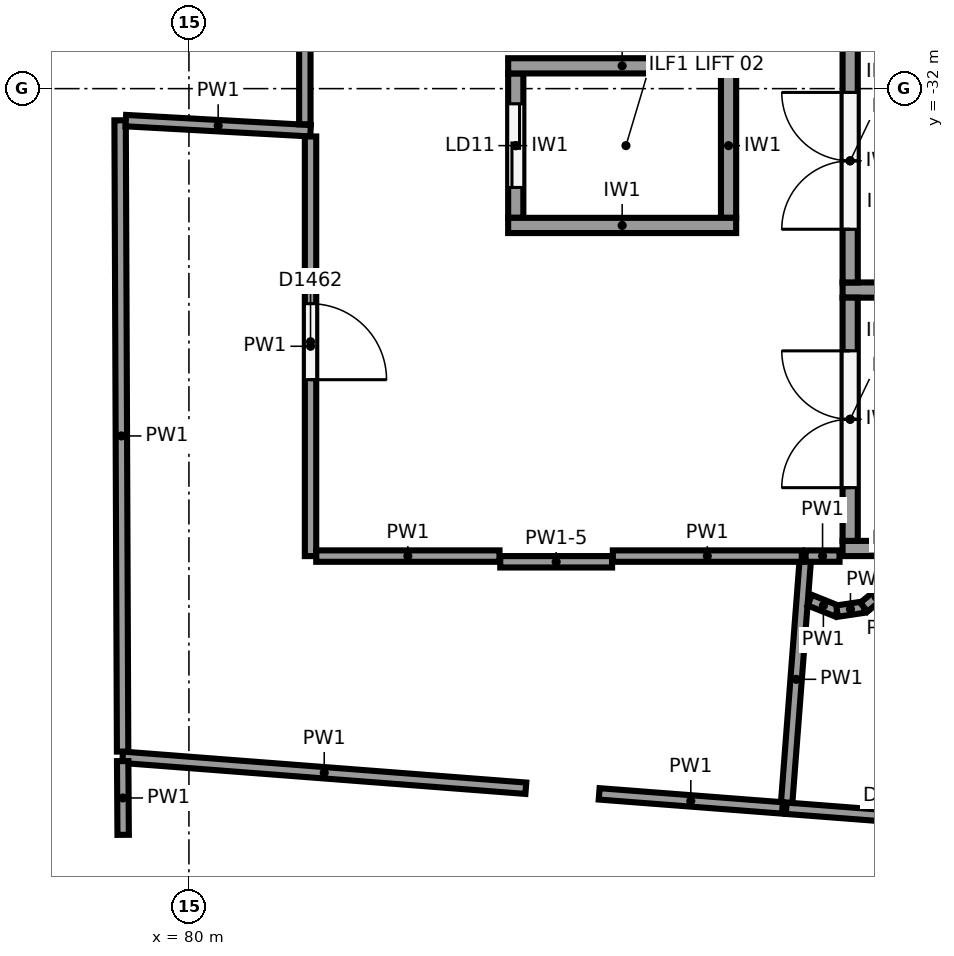
"""IFC4 building model, lengths in metres.
Left out: names, types, materials, properties, quantities, classifications, styles, units other than length and angle.
Written with IfcOpenShell. Run it as: python <this file> out.ifc"""

import sys

from ifc_helpers import new_model, si_unit, direction, frame, frame_2d, origin, place, context, subcontext, project, spatial, rectangle, extrude, element, fill, save


model = new_model("IFC4")
c1 = context("Model", 3, precision=1e-05, world=origin(), true_north=direction((0.0, 1.0)))
c2 = subcontext(c1, "Body", "Model", "MODEL_VIEW")
j1 = project(units=[si_unit("LENGTHUNIT", "METRE"), si_unit("PLANEANGLEUNIT", "RADIAN")], contexts=[c1])
p1 = place(None, origin())
s1 = spatial("IfcSite", under=j1, at=p1, CompositionType="ELEMENT")
p2 = place(p1, origin())
s2 = spatial("IfcBuilding", under=s1, at=p2, CompositionType="ELEMENT")
p3 = place(p2, frame((0.0, 0.0, 18.0)))
s3 = spatial("IfcBuildingStorey", under=s2, at=p3, CompositionType="ELEMENT", Elevation=18.0)
for number, where, z_axis, x_axis in (
    (1, (97.6, -38.05, 0.0), (0.0, 0.0, 1.0), (-1.0, 0.0, 0.0)),
    (2, (97.6, -34.65, 0.0), (0.0, 0.0, 1.0), (-1.0, 0.0, 0.0)),
):
    element("IfcWall", number, at=place(p3, frame(where, z_axis=z_axis, x_axis=x_axis)), inside=s3, PredefinedType="SHEAR", context=c2, shape_type="SweptSolid", body=[
        extrude(rectangle(XDim=9.0, YDim=0.2, at=frame_2d((4.5, 0.0))), origin(), (0.0, 0.0, 1.0), 5.6),
    ])
p4 = place(p3, frame((88.7, -37.95, 0.0), z_axis=(0.0, 0.0, 1.0), x_axis=(0.0, 1.0, 0.0)))
e3 = element("IfcWall", 3, at=p4, inside=s3, PredefinedType="SHEAR", context=c2, shape_type="SweptSolid", body=[
    extrude(rectangle(XDim=3.2, YDim=0.2, at=frame_2d((1.6, 0.0))), origin(), (0.0, 0.0, 1.0), 5.6),
])
p5 = place(p4, frame((0.7, 0.0, 0.0)))
e4 = element("IfcOpeningElement", 4, at=p5, cuts=e3, PredefinedType="OPENING", context=c2, shape_type="SweptSolid", body=[
    extrude(rectangle(XDim=1.8, YDim=2.1, at=frame_2d((0.9, 1.05))), frame((0.0, 0.11, 0.0), z_axis=(0.0, -1.0, 0.0), x_axis=(1.0, 0.0, 0.0)), (0.0, 0.0, 1.0), 0.22),
])
p6 = place(p3, frame((88.7, -34.55, 0.0), z_axis=(0.0, 0.0, 1.0), x_axis=(0.0, 1.0, 0.0)))
e5 = element("IfcWall", 5, at=p6, inside=s3, PredefinedType="SHEAR", context=c2, shape_type="SweptSolid", body=[
    extrude(rectangle(XDim=3.2, YDim=0.2, at=frame_2d((1.6, 0.0))), origin(), (0.0, 0.0, 1.0), 5.6),
])
p7 = place(p6, frame((0.7, 0.0, 0.0)))
e6 = element("IfcOpeningElement", 6, at=p7, cuts=e5, PredefinedType="OPENING", context=c2, shape_type="SweptSolid", body=[
    extrude(rectangle(XDim=1.8, YDim=2.1, at=frame_2d((0.9, 1.05))), frame((0.0, 0.11, 0.0), z_axis=(0.0, -1.0, 0.0), x_axis=(1.0, 0.0, 0.0)), (0.0, 0.0, 1.0), 0.22),
])
for number, where, z_axis, x_axis in (
    (7, (87.2, -33.8, 0.0), (0.0, 0.0, 1.0), (-1.0, 0.0, 0.0)),
    (8, (87.2, -31.7, 0.0), (0.0, 0.0, 1.0), (-1.0, 0.0, 0.0)),
):
    element("IfcWall", number, at=place(p3, frame(where, z_axis=z_axis, x_axis=x_axis)), inside=s3, PredefinedType="SHEAR", context=c2, shape_type="SweptSolid", body=[
        extrude(rectangle(XDim=3.0, YDim=0.2, at=frame_2d((1.5, 0.0))), origin(), (0.0, 0.0, 1.0), 5.6),
    ])
p8 = place(p3, frame((87.1, -33.7, 0.0), z_axis=(0.0, 0.0, 1.0), x_axis=(0.0, 1.0, 0.0)))
e9 = element("IfcWall", 9, at=p8, inside=s3, PredefinedType="SHEAR", context=c2, shape_type="SweptSolid", body=[
    extrude(rectangle(XDim=1.9, YDim=0.2, at=frame_2d((0.95, 0.0))), origin(), (0.0, 0.0, 1.0), 5.6),
])
p9 = place(p3, frame((84.3, -33.7, 0.0), z_axis=(0.0, 0.0, 1.0), x_axis=(0.0, 1.0, 0.0)))
e10 = element("IfcWall", 10, at=p9, inside=s3, PredefinedType="SHEAR", context=c2, shape_type="SweptSolid", body=[
    extrude(rectangle(XDim=1.9, YDim=0.2, at=frame_2d((0.95, 0.0))), origin(), (0.0, 0.0, 1.0), 5.6),
])
p10 = place(p9, frame((0.4, 0.0, 0.0)))
e11 = element("IfcOpeningElement", 11, at=p10, cuts=e10, PredefinedType="OPENING", context=c2, shape_type="SweptSolid", body=[
    extrude(rectangle(XDim=1.1, YDim=2.1, at=frame_2d((0.55, 1.05))), frame((0.0, 0.11, 0.0), z_axis=(0.0, -1.0, 0.0), x_axis=(1.0, 0.0, 0.0)), (0.0, 0.0, 1.0), 0.22),
])
p11 = place(p3, frame((92.672, -41.837, 0.0), z_axis=(0.0, 0.0, 1.0), x_axis=(-0.997068154384, 0.07651859587, 0.0)))
e12 = element("IfcWall", 12, at=p11, inside=s3, PredefinedType="PARTITIONING", context=c2, shape_type="SweptSolid", body=[
    extrude(rectangle(XDim=4.827, YDim=0.15, at=frame_2d((2.414, 0.0))), origin(), (0.0, 0.0, 1.0), 5.6),
])
p12 = place(p11, frame((1.95, 0.0, 0.0)))
e13 = element("IfcOpeningElement", 13, at=p12, cuts=e12, PredefinedType="OPENING", context=c2, shape_type="SweptSolid", body=[
    extrude(rectangle(XDim=1.0, YDim=2.1, at=frame_2d((0.5, 1.05))), frame((0.0, 0.085, 0.0), z_axis=(0.0, -1.0, 0.0), x_axis=(1.0, 0.0, 0.0)), (0.0, 0.0, 1.0), 0.17),
])
p13 = place(p3, frame((87.865, -41.392, 0.0), z_axis=(0.0, 0.0, 1.0), x_axis=(0.076501302727, 0.997069481371, 0.0)))
e14 = element("IfcWall", 14, at=p13, inside=s3, PredefinedType="PARTITIONING", context=c2, shape_type="SweptSolid", body=[
    extrude(rectangle(XDim=3.252, YDim=0.15, at=frame_2d((1.626, 0.0))), origin(), (0.0, 0.0, 1.0), 5.6),
])
p14 = place(p3, frame((88.113, -38.15, 0.0), z_axis=(0.0, 0.0, 1.0), x_axis=(1.0, 0.0, 0.0)))
e15 = element("IfcWall", 15, at=p14, inside=s3, PredefinedType="PARTITIONING", context=c2, shape_type="SweptSolid", body=[
    extrude(rectangle(XDim=0.447, YDim=0.15, at=frame_2d((0.223, 0.0))), origin(), (0.0, 0.0, 1.0), 5.6),
])
p15 = place(p3, frame((87.809, -41.463, 0.0), z_axis=(0.0, 0.0, 1.0), x_axis=(-0.997068127428, 0.076518947109, 0.0)))
e16 = element("IfcWall", 16, at=p15, inside=s3, PredefinedType="PARTITIONING", context=c2, shape_type="SweptSolid", body=[
    extrude(rectangle(XDim=2.418, YDim=0.15, at=frame_2d((1.209, 0.0))), origin(), (0.0, 0.0, 1.0), 5.6),
])
p16 = place(p3, frame((84.433, -41.204, 0.0), z_axis=(0.0, 0.0, 1.0), x_axis=(-0.997070388633, 0.076489477122, 0.0)))
e17 = element("IfcWall", 17, at=p16, inside=s3, PredefinedType="PARTITIONING", context=c2, shape_type="SweptSolid", body=[
    extrude(rectangle(XDim=5.321, YDim=0.15, at=frame_2d((2.66, 0.0))), origin(), (0.0, 0.0, 1.0), 5.6),
])
p17 = place(p3, frame((79.127, -40.722, 0.0), z_axis=(0.0, 0.0, 1.0), x_axis=(-0.003939176304, 0.999992241415, 0.0)))
e18 = element("IfcWall", 18, at=p17, inside=s3, PredefinedType="PARTITIONING", context=c2, shape_type="SweptSolid", body=[
    extrude(rectangle(XDim=8.305, YDim=0.15, at=frame_2d((4.152, 0.0))), origin(), (0.0, 0.0, 1.0), 5.6),
])
p18 = place(p3, frame((79.169, -32.421, 0.0), z_axis=(0.0, 0.0, 1.0), x_axis=(0.998499599384, -0.054759017805, 0.0)))
e19 = element("IfcWall", 19, at=p18, inside=s3, PredefinedType="PARTITIONING", context=c2, shape_type="SweptSolid", body=[
    extrude(rectangle(XDim=2.434, YDim=0.15, at=frame_2d((1.217, 0.0))), origin(), (0.0, 0.0, 1.0), 5.6),
])
p19 = place(p3, frame((81.6, -32.629, 0.0), z_axis=(0.0, 0.0, 1.0), x_axis=(0.0, -1.0, 0.0)))
e20 = element("IfcWall", 20, at=p19, inside=s3, PredefinedType="PARTITIONING", context=c2, shape_type="SweptSolid", body=[
    extrude(rectangle(XDim=5.521, YDim=0.15, at=frame_2d((2.76, 0.0))), origin(), (0.0, 0.0, 1.0), 5.6),
])
p20 = place(p19, frame((2.2, 0.0, 0.0)))
e21 = element("IfcOpeningElement", 21, at=p20, cuts=e20, PredefinedType="OPENING", context=c2, shape_type="SweptSolid", body=[
    extrude(rectangle(XDim=1.0, YDim=2.1, at=frame_2d((0.5, 1.05))), frame((0.0, 0.085, 0.0), z_axis=(0.0, -1.0, 0.0), x_axis=(1.0, 0.0, 0.0)), (0.0, 0.0, 1.0), 0.17),
])
p21 = place(p3, frame((81.675, -38.15, 0.0), z_axis=(0.0, 0.0, 1.0), x_axis=(1.0, 0.0, 0.0)))
e22 = element("IfcWall", 22, at=p21, inside=s3, PredefinedType="PARTITIONING", context=c2, shape_type="SweptSolid", body=[
    extrude(rectangle(XDim=2.411, YDim=0.15, at=frame_2d((1.206, 0.0))), origin(), (0.0, 0.0, 1.0), 5.6),
])
p22 = place(p3, frame((85.577, -38.15, 0.0), z_axis=(0.0, 0.0, 1.0), x_axis=(1.0, 0.0, 0.0)))
e23 = element("IfcWall", 23, at=p22, inside=s3, PredefinedType="PARTITIONING", context=c2, shape_type="SweptSolid", body=[
    extrude(rectangle(XDim=2.486, YDim=0.15, at=frame_2d((1.243, 0.0))), origin(), (0.0, 0.0, 1.0), 5.6),
])
p23 = place(p3, frame((79.135, -41.817, 0.0), z_axis=(0.0, 0.0, 1.0), x_axis=(-0.006544033042, 0.999978587587, 0.0)))
e24 = element("IfcWall", 24, at=p23, inside=s3, PredefinedType="PARTITIONING", context=c2, shape_type="SweptSolid", body=[
    extrude(rectangle(XDim=0.97, YDim=0.15, at=frame_2d((0.485, 0.0))), origin(), (0.0, 0.0, 1.0), 5.6),
])
p24 = place(p3, frame((81.525, -28.219, 0.0), z_axis=(0.0, 0.0, 1.0), x_axis=(0.0, -1.0, 0.0)))
e25 = element("IfcWall", 25, at=p24, inside=s3, PredefinedType="PARTITIONING", context=c2, shape_type="SweptSolid", body=[
    extrude(rectangle(XDim=4.25, YDim=0.15, at=frame_2d((2.125, 0.0))), origin(), (0.0, 0.0, 1.0), 5.6),
])
p25 = place(p24, frame((1.15, 0.0, 0.0)))
e26 = element("IfcOpeningElement", 26, at=p25, cuts=e25, PredefinedType="OPENING", context=c2, shape_type="SweptSolid", body=[
    extrude(rectangle(XDim=1.8, YDim=2.1, at=frame_2d((0.9, 1.05))), frame((0.0, 0.085, 0.0), z_axis=(0.0, -1.0, 0.0), x_axis=(1.0, 0.0, 0.0)), (0.0, 0.0, 1.0), 0.17),
])
p26 = place(p3, frame((84.096, -38.225, 0.0), z_axis=(0.0, 0.0, 1.0), x_axis=(1.0, 0.0, 0.0)))
e27 = element("IfcWall", 27, at=p26, inside=s3, PredefinedType="PARTITIONING", context=c2, shape_type="SweptSolid", body=[
    extrude(rectangle(XDim=1.471, YDim=0.15, at=frame_2d((0.736, 0.0))), origin(), (0.0, 0.0, 1.0), 4.3),
])
p27 = place(p3, frame((88.168, -38.729, 0.0), z_axis=(0.0, 0.0, 1.0), x_axis=(0.927779575936, -0.373128742496, 0.0)))
e28 = element("IfcWall", 28, at=p27, inside=s3, PredefinedType="PARTITIONING", context=c2, shape_type="SweptSolid", body=[
    extrude(rectangle(XDim=0.387, YDim=0.15, at=frame_2d((0.194, 0.0))), origin(), (0.0, 0.0, 1.0), 5.6),
])
p28 = place(p3, frame((88.527, -38.874, 0.0), z_axis=(0.0, 0.0, 1.0), x_axis=(0.989140978774, 0.146969806798, 0.0)))
e29 = element("IfcWall", 29, at=p28, inside=s3, PredefinedType="PARTITIONING", context=c2, shape_type="SweptSolid", body=[
    extrude(rectangle(XDim=0.357, YDim=0.15, at=frame_2d((0.179, 0.0))), origin(), (0.0, 0.0, 1.0), 5.6),
])
p29 = place(p3, frame((88.88, -38.822, 0.0), z_axis=(0.0, 0.0, 1.0), x_axis=(0.773256370555, 0.634093514709, 0.0)))
e30 = element("IfcWall", 30, at=p29, inside=s3, PredefinedType="PARTITIONING", context=c2, shape_type="SweptSolid", body=[
    extrude(rectangle(XDim=0.419, YDim=0.15, at=frame_2d((0.209, 0.0))), origin(), (0.0, 0.0, 1.0), 5.6),
])
p30 = place(p5, origin())
e31 = element("IfcDoor", 31, at=p30, inside=s3, OperationType="DOUBLE_DOOR_SINGLE_SWING", PredefinedType="DOOR", context=c2, shape_type="SweptSolid", body=[
    extrude(rectangle(XDim=1.8, YDim=2.1, at=frame_2d((0.9, 1.05))), frame((0.0, 0.025, 0.0), z_axis=(0.0, -1.0, 0.0), x_axis=(1.0, 0.0, 0.0)), (0.0, 0.0, 1.0), 0.05),
])
fill(e4, e31)
p31 = place(p7, origin())
e32 = element("IfcDoor", 32, at=p31, inside=s3, OperationType="DOUBLE_DOOR_SINGLE_SWING", PredefinedType="DOOR", context=c2, shape_type="SweptSolid", body=[
    extrude(rectangle(XDim=1.8, YDim=2.1, at=frame_2d((0.9, 1.05))), frame((0.0, 0.025, 0.0), z_axis=(0.0, -1.0, 0.0), x_axis=(1.0, 0.0, 0.0)), (0.0, 0.0, 1.0), 0.05),
])
fill(e6, e32)
p32 = place(p10, origin())
e33 = element("IfcDoor", 33, at=p32, inside=s3, OperationType="SLIDING_TO_LEFT", PredefinedType="DOOR", context=c2, shape_type="SweptSolid", body=[
    extrude(rectangle(XDim=1.1, YDim=2.1, at=frame_2d((0.55, 1.05))), frame((0.0, 0.025, 0.0), z_axis=(0.0, -1.0, 0.0), x_axis=(1.0, 0.0, 0.0)), (0.0, 0.0, 1.0), 0.05),
])
fill(e11, e33)
p33 = place(p20, origin())
e34 = element("IfcDoor", 34, at=p33, inside=s3, OperationType="SINGLE_SWING_RIGHT", PredefinedType="DOOR", context=c2, shape_type="SweptSolid", body=[
    extrude(rectangle(XDim=1.0, YDim=2.1, at=frame_2d((0.5, 1.05))), frame((0.0, 0.025, 0.0), z_axis=(0.0, -1.0, 0.0), x_axis=(1.0, 0.0, 0.0)), (0.0, 0.0, 1.0), 0.05),
])
fill(e21, e34)
save(model, sys.argv[1])
